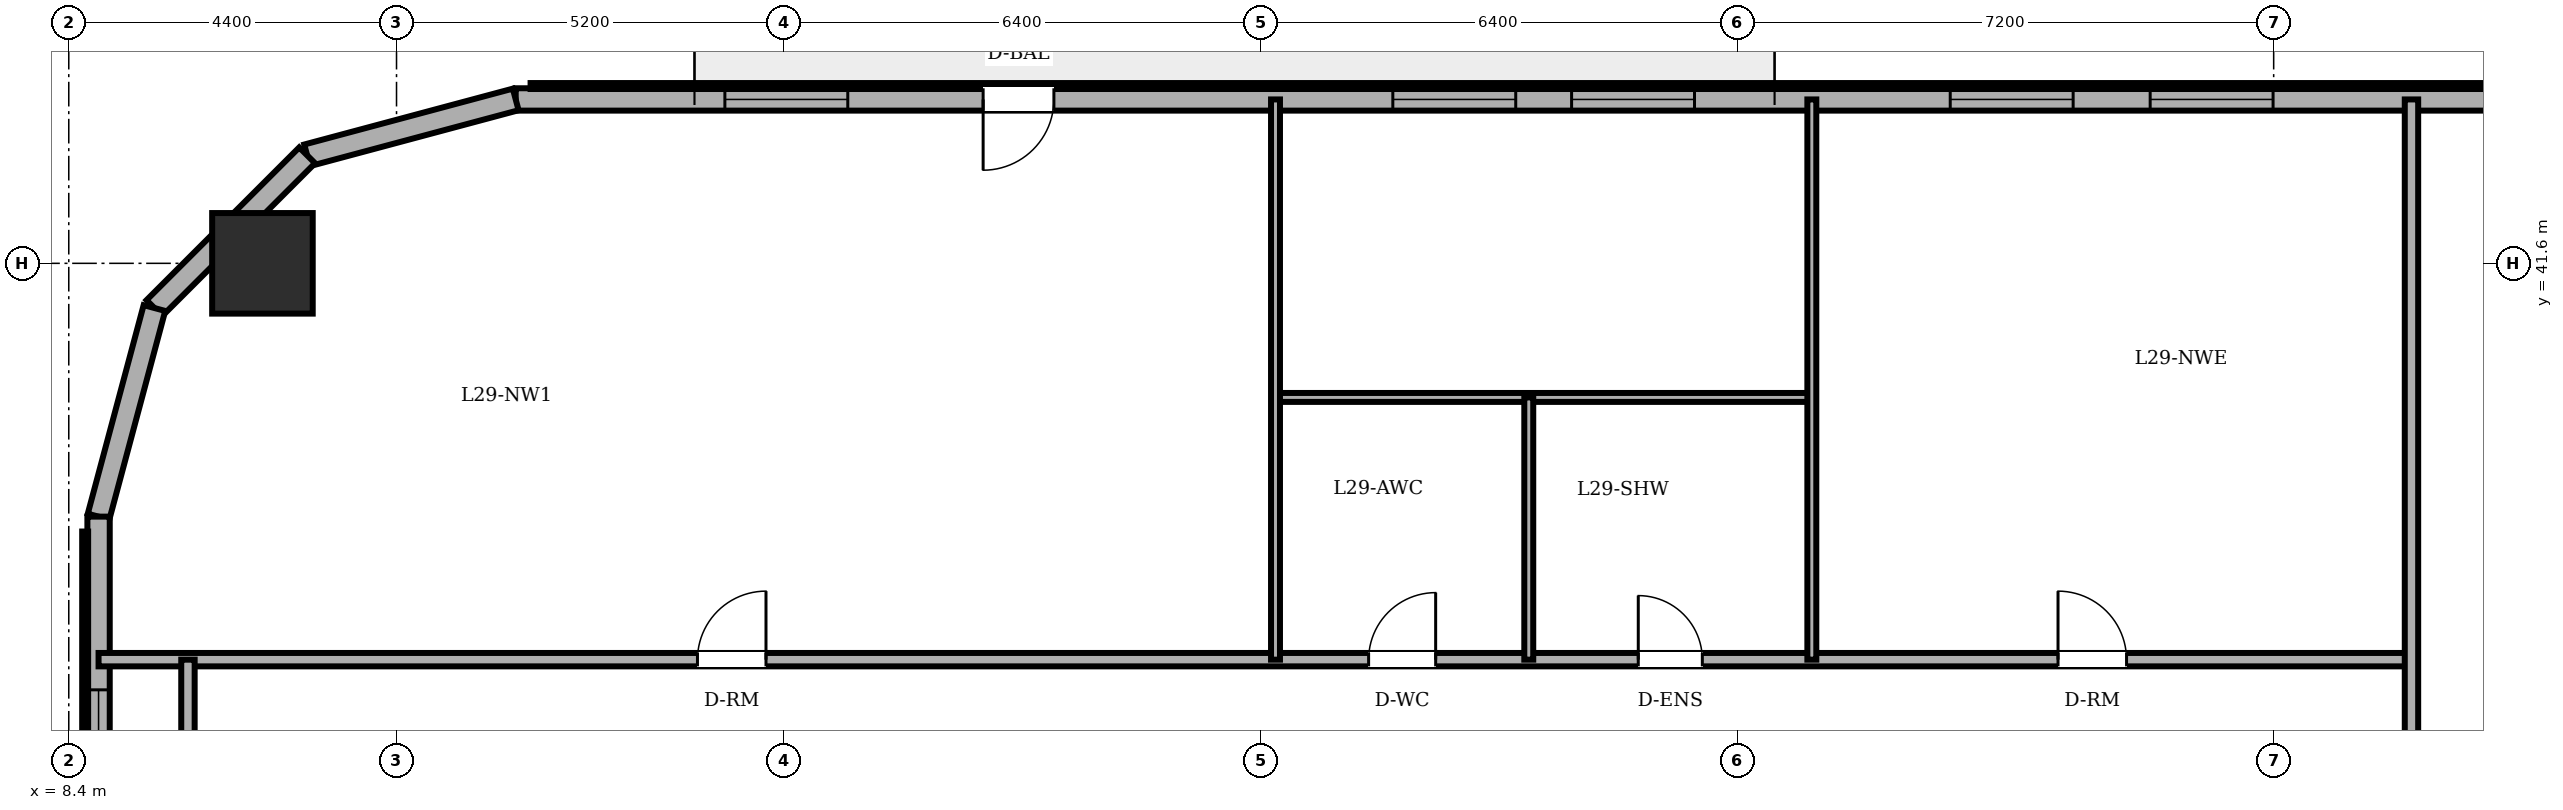
"""IFC4 building model, lengths in metres.
Left out: names, types, materials, properties, quantities, classifications, styles, units other than length and angle.
Written with IfcOpenShell. Run it as: python <this file> out.ifc"""

import sys

from ifc_helpers import new_model, si_unit, direction, frame, frame_2d, origin, origin_2d, place, context, subcontext, project, spatial, rectangle, circle, extrude, element, fill, save


model = new_model("IFC4")
c1 = context("Model", 3, precision=1e-05, world=origin(), true_north=direction((0.0, 1.0)))
c2 = subcontext(c1, "Body", "Model", "MODEL_VIEW")
j1 = project(units=[si_unit("LENGTHUNIT", "METRE"), si_unit("PLANEANGLEUNIT", "RADIAN")], contexts=[c1])
p1 = place(None, origin())
s1 = spatial("IfcSite", under=j1, at=p1, CompositionType="ELEMENT")
p2 = place(p1, origin())
s2 = spatial("IfcBuilding", under=s1, at=p2, CompositionType="ELEMENT")
p3 = place(p2, frame((0.0, 0.0, 111.5)))
s3 = spatial("IfcBuildingStorey", under=s2, at=p3, CompositionType="ELEMENT", Elevation=111.5)
p4 = place(p3, frame((11.0, 41.6, 0.0), z_axis=(0.0, 0.0, 1.0), x_axis=(1.0, 0.0, 0.0)))
e1 = element("IfcColumn", 1, at=p4, inside=s3, PredefinedType="COLUMN", context=c2, shape_type="SweptSolid", body=[
    extrude(circle(Radius=0.675, at=origin_2d()), origin(), (0.0, 0.0, 1.0), 3.6),
])
p5 = place(p3, frame((44.333, 43.8, 0.0), z_axis=(0.0, 0.0, 1.0), x_axis=(-1.0, 0.0, 0.0)))
e2 = element("IfcWall", 2, at=p5, inside=s3, PredefinedType="SOLIDWALL", context=c2, shape_type="SweptSolid", body=[
    extrude(rectangle(XDim=29.933, YDim=0.3, at=frame_2d((14.967, 0.0))), origin(), (0.0, 0.0, 1.0), 3.4),
])
p6 = place(p5, frame((22.708, 0.0, 0.0)))
e3 = element("IfcOpeningElement", 3, at=p6, cuts=e2, PredefinedType="OPENING", context=c2, shape_type="SweptSolid", body=[
    extrude(rectangle(XDim=0.95, YDim=2.2, at=frame_2d((0.475, 1.1))), frame((0.0, 0.16, 0.0), z_axis=(0.0, -1.0, 0.0), x_axis=(1.0, 0.0, 0.0)), (0.0, 0.0, 1.0), 0.32),
])
p7 = place(p5, frame((1.729, 0.0, 0.85)))
e4 = element("IfcOpeningElement", 4, at=p7, cuts=e2, PredefinedType="OPENING", context=c2, shape_type="SweptSolid", body=[
    extrude(rectangle(XDim=1.65, YDim=1.55, at=frame_2d((0.825, 0.775))), frame((0.0, 0.16, 0.0), z_axis=(0.0, -1.0, 0.0), x_axis=(1.0, 0.0, 0.0)), (0.0, 0.0, 1.0), 0.32),
])
p8 = place(p5, frame((6.341, 0.0, 0.85)))
e5 = element("IfcOpeningElement", 5, at=p8, cuts=e2, PredefinedType="OPENING", context=c2, shape_type="SweptSolid", body=[
    extrude(rectangle(XDim=1.65, YDim=1.55, at=frame_2d((0.825, 0.775))), frame((0.0, 0.16, 0.0), z_axis=(0.0, -1.0, 0.0), x_axis=(1.0, 0.0, 0.0)), (0.0, 0.0, 1.0), 0.32),
])
p9 = place(p5, frame((9.025, 0.0, 0.85)))
e6 = element("IfcOpeningElement", 6, at=p9, cuts=e2, PredefinedType="OPENING", context=c2, shape_type="SweptSolid", body=[
    extrude(rectangle(XDim=1.65, YDim=1.55, at=frame_2d((0.825, 0.775))), frame((0.0, 0.16, 0.0), z_axis=(0.0, -1.0, 0.0), x_axis=(1.0, 0.0, 0.0)), (0.0, 0.0, 1.0), 0.32),
])
p10 = place(p5, frame((14.108, 0.0, 0.85)))
e7 = element("IfcOpeningElement", 7, at=p10, cuts=e2, PredefinedType="OPENING", context=c2, shape_type="SweptSolid", body=[
    extrude(rectangle(XDim=1.65, YDim=1.55, at=frame_2d((0.825, 0.775))), frame((0.0, 0.16, 0.0), z_axis=(0.0, -1.0, 0.0), x_axis=(1.0, 0.0, 0.0)), (0.0, 0.0, 1.0), 0.32),
])
p11 = place(p5, frame((16.508, 0.0, 0.85)))
e8 = element("IfcOpeningElement", 8, at=p11, cuts=e2, PredefinedType="OPENING", context=c2, shape_type="SweptSolid", body=[
    extrude(rectangle(XDim=1.65, YDim=1.55, at=frame_2d((0.825, 0.775))), frame((0.0, 0.16, 0.0), z_axis=(0.0, -1.0, 0.0), x_axis=(1.0, 0.0, 0.0)), (0.0, 0.0, 1.0), 0.32),
])
p12 = place(p5, frame((25.475, 0.0, 0.85)))
e9 = element("IfcOpeningElement", 9, at=p12, cuts=e2, PredefinedType="OPENING", context=c2, shape_type="SweptSolid", body=[
    extrude(rectangle(XDim=1.65, YDim=1.55, at=frame_2d((0.825, 0.775))), frame((0.0, 0.16, 0.0), z_axis=(0.0, -1.0, 0.0), x_axis=(1.0, 0.0, 0.0)), (0.0, 0.0, 1.0), 0.32),
])
p13 = place(p3, frame((14.4, 43.8, 0.0), z_axis=(0.0, 0.0, 1.0), x_axis=(-0.965943540406, -0.258752926066, 0.0)))
e10 = element("IfcWall", 10, at=p13, inside=s3, PredefinedType="SOLIDWALL", context=c2, shape_type="SweptSolid", body=[
    extrude(rectangle(XDim=2.898, YDim=0.3, at=frame_2d((1.449, 0.0))), origin(), (0.0, 0.0, 1.0), 3.4),
])
p14 = place(p3, frame((11.6, 43.05, 0.0), z_axis=(0.0, 0.0, 1.0), x_axis=(-0.707106781187, -0.707106781187, 0.0)))
e11 = element("IfcWall", 11, at=p14, inside=s3, PredefinedType="SOLIDWALL", context=c2, shape_type="SweptSolid", body=[
    extrude(rectangle(XDim=2.899, YDim=0.3, at=frame_2d((1.45, 0.0))), origin(), (0.0, 0.0, 1.0), 3.4),
])
p15 = place(p3, frame((9.55, 41.0, 0.0), z_axis=(0.0, 0.0, 1.0), x_axis=(-0.258731875344, -0.96594917914, 0.0)))
e12 = element("IfcWall", 12, at=p15, inside=s3, PredefinedType="SOLIDWALL", context=c2, shape_type="SweptSolid", body=[
    extrude(rectangle(XDim=2.899, YDim=0.3, at=frame_2d((1.449, 0.0))), origin(), (0.0, 0.0, 1.0), 3.4),
])
p16 = place(p3, frame((8.8, 38.2, 0.0), z_axis=(0.0, 0.0, 1.0), x_axis=(0.0, -1.0, 0.0)))
e13 = element("IfcWall", 13, at=p16, inside=s3, PredefinedType="SOLIDWALL", context=c2, shape_type="SweptSolid", body=[
    extrude(rectangle(XDim=28.4, YDim=0.3, at=frame_2d((14.2, 0.0))), origin(), (0.0, 0.0, 1.0), 3.4),
])
p17 = place(p16, frame((2.325, 0.0, 0.85)))
e14 = element("IfcOpeningElement", 14, at=p17, cuts=e13, PredefinedType="OPENING", context=c2, shape_type="SweptSolid", body=[
    extrude(rectangle(XDim=1.65, YDim=1.55, at=frame_2d((0.825, 0.775))), frame((0.0, 0.16, 0.0), z_axis=(0.0, -1.0, 0.0), x_axis=(1.0, 0.0, 0.0)), (0.0, 0.0, 1.0), 0.32),
])
p18 = place(p16, frame((6.828, 0.0, 0.85)))
e15 = element("IfcOpeningElement", 15, at=p18, cuts=e13, PredefinedType="OPENING", context=c2, shape_type="SweptSolid", body=[
    extrude(rectangle(XDim=1.65, YDim=1.55, at=frame_2d((0.825, 0.775))), frame((0.0, 0.16, 0.0), z_axis=(0.0, -1.0, 0.0), x_axis=(1.0, 0.0, 0.0)), (0.0, 0.0, 1.0), 0.32),
])
p19 = place(p16, frame((10.102, 0.0, 0.85)))
e16 = element("IfcOpeningElement", 16, at=p19, cuts=e13, PredefinedType="OPENING", context=c2, shape_type="SweptSolid", body=[
    extrude(rectangle(XDim=1.65, YDim=1.55, at=frame_2d((0.825, 0.775))), frame((0.0, 0.16, 0.0), z_axis=(0.0, -1.0, 0.0), x_axis=(1.0, 0.0, 0.0)), (0.0, 0.0, 1.0), 0.32),
])
p20 = place(p16, frame((16.648, 0.0, 0.85)))
e17 = element("IfcOpeningElement", 17, at=p20, cuts=e13, PredefinedType="OPENING", context=c2, shape_type="SweptSolid", body=[
    extrude(rectangle(XDim=1.65, YDim=1.55, at=frame_2d((0.825, 0.775))), frame((0.0, 0.16, 0.0), z_axis=(0.0, -1.0, 0.0), x_axis=(1.0, 0.0, 0.0)), (0.0, 0.0, 1.0), 0.32),
])
p21 = place(p16, frame((19.922, 0.0, 0.85)))
e18 = element("IfcOpeningElement", 18, at=p21, cuts=e13, PredefinedType="OPENING", context=c2, shape_type="SweptSolid", body=[
    extrude(rectangle(XDim=1.65, YDim=1.55, at=frame_2d((0.825, 0.775))), frame((0.0, 0.16, 0.0), z_axis=(0.0, -1.0, 0.0), x_axis=(1.0, 0.0, 0.0)), (0.0, 0.0, 1.0), 0.32),
])
p22 = place(p16, frame((24.425, 0.0, 0.85)))
e19 = element("IfcOpeningElement", 19, at=p22, cuts=e13, PredefinedType="OPENING", context=c2, shape_type="SweptSolid", body=[
    extrude(rectangle(XDim=1.65, YDim=1.55, at=frame_2d((0.825, 0.775))), frame((0.0, 0.16, 0.0), z_axis=(0.0, -1.0, 0.0), x_axis=(1.0, 0.0, 0.0)), (0.0, 0.0, 1.0), 0.32),
])
p23 = place(p3, frame((8.8, 36.28, 0.0), z_axis=(0.0, 0.0, 1.0), x_axis=(1.0, 0.0, 0.0)))
e20 = element("IfcWall", 20, at=p23, inside=s3, PredefinedType="PARTITIONING", context=c2, shape_type="SweptSolid", body=[
    extrude(rectangle(XDim=31.05, YDim=0.18, at=frame_2d((15.525, 0.0))), origin(), (0.0, 0.0, 1.0), 3.4),
])
p24 = place(p23, frame((17.05, 0.0, 0.0)))
e21 = element("IfcOpeningElement", 21, at=p24, cuts=e20, PredefinedType="OPENING", context=c2, shape_type="SweptSolid", body=[
    extrude(rectangle(XDim=0.9, YDim=2.1, at=frame_2d((0.45, 1.05))), frame((0.0, 0.1, 0.0), z_axis=(0.0, -1.0, 0.0), x_axis=(1.0, 0.0, 0.0)), (0.0, 0.0, 1.0), 0.2),
])
p25 = place(p23, frame((20.67, 0.0, 0.0)))
e22 = element("IfcOpeningElement", 22, at=p25, cuts=e20, PredefinedType="OPENING", context=c2, shape_type="SweptSolid", body=[
    extrude(rectangle(XDim=0.86, YDim=2.1, at=frame_2d((0.43, 1.05))), frame((0.0, 0.1, 0.0), z_axis=(0.0, -1.0, 0.0), x_axis=(1.0, 0.0, 0.0)), (0.0, 0.0, 1.0), 0.2),
])
p26 = place(p23, frame((8.04, 0.0, 0.0)))
e23 = element("IfcOpeningElement", 23, at=p26, cuts=e20, PredefinedType="OPENING", context=c2, shape_type="SweptSolid", body=[
    extrude(rectangle(XDim=0.92, YDim=2.1, at=frame_2d((0.46, 1.05))), frame((0.0, 0.1, 0.0), z_axis=(0.0, -1.0, 0.0), x_axis=(1.0, 0.0, 0.0)), (0.0, 0.0, 1.0), 0.2),
])
p27 = place(p23, frame((26.305, 0.0, 0.0)))
e24 = element("IfcOpeningElement", 24, at=p27, cuts=e20, PredefinedType="OPENING", context=c2, shape_type="SweptSolid", body=[
    extrude(rectangle(XDim=0.92, YDim=2.1, at=frame_2d((0.46, 1.05))), frame((0.0, 0.1, 0.0), z_axis=(0.0, -1.0, 0.0), x_axis=(1.0, 0.0, 0.0)), (0.0, 0.0, 1.0), 0.2),
])
p28 = place(p3, frame((24.6, 39.8, 0.0), z_axis=(0.0, 0.0, 1.0), x_axis=(1.0, 0.0, 0.0)))
e25 = element("IfcWall", 25, at=p28, inside=s3, PredefinedType="PARTITIONING", context=c2, shape_type="SweptSolid", body=[
    extrude(rectangle(XDim=7.2, YDim=0.12, at=frame_2d((3.6, 0.0))), origin(), (0.0, 0.0, 1.0), 3.4),
])
p29 = place(p3, frame((10.0, 33.82, 0.0), z_axis=(0.0, 0.0, 1.0), x_axis=(0.0, 1.0, 0.0)))
e26 = element("IfcWall", 26, at=p29, inside=s3, PredefinedType="PARTITIONING", context=c2, shape_type="SweptSolid", body=[
    extrude(rectangle(XDim=2.46, YDim=0.18, at=frame_2d((1.23, 0.0))), origin(), (0.0, 0.0, 1.0), 3.4),
])
p30 = place(p3, frame((24.6, 36.28, 0.0), z_axis=(0.0, 0.0, 1.0), x_axis=(0.0, 1.0, 0.0)))
e27 = element("IfcWall", 27, at=p30, inside=s3, PredefinedType="PARTITIONING", context=c2, shape_type="SweptSolid", body=[
    extrude(rectangle(XDim=7.52, YDim=0.12, at=frame_2d((3.76, 0.0))), origin(), (0.0, 0.0, 1.0), 3.4),
])
p31 = place(p3, frame((28.0, 36.28, 0.0), z_axis=(0.0, 0.0, 1.0), x_axis=(0.0, 1.0, 0.0)))
e28 = element("IfcWall", 28, at=p31, inside=s3, PredefinedType="PARTITIONING", context=c2, shape_type="SweptSolid", body=[
    extrude(rectangle(XDim=3.52, YDim=0.12, at=frame_2d((1.76, 0.0))), origin(), (0.0, 0.0, 1.0), 3.4),
])
p32 = place(p3, frame((31.8, 36.28, 0.0), z_axis=(0.0, 0.0, 1.0), x_axis=(0.0, 1.0, 0.0)))
e29 = element("IfcWall", 29, at=p32, inside=s3, PredefinedType="PARTITIONING", context=c2, shape_type="SweptSolid", body=[
    extrude(rectangle(XDim=7.52, YDim=0.12, at=frame_2d((3.76, 0.0))), origin(), (0.0, 0.0, 1.0), 3.4),
])
p33 = place(p3, frame((39.85, 25.18, 0.0), z_axis=(0.0, 0.0, 1.0), x_axis=(0.0, 1.0, 0.0)))
e30 = element("IfcWall", 30, at=p33, inside=s3, PredefinedType="PARTITIONING", context=c2, shape_type="SweptSolid", body=[
    extrude(rectangle(XDim=18.62, YDim=0.18, at=frame_2d((9.31, 0.0))), origin(), (0.0, 0.0, 1.0), 3.4),
])
p34 = place(p33, frame((5.35, 0.0, 0.0)))
e31 = element("IfcOpeningElement", 31, at=p34, cuts=e30, PredefinedType="OPENING", context=c2, shape_type="SweptSolid", body=[
    extrude(rectangle(XDim=0.92, YDim=2.1, at=frame_2d((0.46, 1.05))), frame((0.0, 0.1, 0.0), z_axis=(0.0, -1.0, 0.0), x_axis=(1.0, 0.0, 0.0)), (0.0, 0.0, 1.0), 0.2),
])
p35 = place(p6, origin())
e32 = element("IfcDoor", 32, at=p35, inside=s3, OperationType="SINGLE_SWING_RIGHT", PredefinedType="DOOR", context=c2, shape_type="SweptSolid", body=[
    extrude(rectangle(XDim=0.95, YDim=2.2, at=frame_2d((0.475, 1.1))), frame((0.0, 0.025, 0.0), z_axis=(0.0, -1.0, 0.0), x_axis=(1.0, 0.0, 0.0)), (0.0, 0.0, 1.0), 0.05),
])
fill(e3, e32)
p36 = place(p8, origin())
e33 = element("IfcWindow", 33, at=p36, inside=s3, PartitioningType="DOUBLE_PANEL_VERTICAL", PredefinedType="WINDOW", context=c2, shape_type="SweptSolid", body=[
    extrude(rectangle(XDim=1.65, YDim=1.55, at=frame_2d((0.825, 0.775))), frame((0.0, 0.03, 0.0), z_axis=(0.0, -1.0, 0.0), x_axis=(1.0, 0.0, 0.0)), (0.0, 0.0, 1.0), 0.06),
])
fill(e5, e33)
p37 = place(p9, origin())
e34 = element("IfcWindow", 34, at=p37, inside=s3, PartitioningType="DOUBLE_PANEL_VERTICAL", PredefinedType="WINDOW", context=c2, shape_type="SweptSolid", body=[
    extrude(rectangle(XDim=1.65, YDim=1.55, at=frame_2d((0.825, 0.775))), frame((0.0, 0.03, 0.0), z_axis=(0.0, -1.0, 0.0), x_axis=(1.0, 0.0, 0.0)), (0.0, 0.0, 1.0), 0.06),
])
fill(e6, e34)
p38 = place(p10, origin())
e35 = element("IfcWindow", 35, at=p38, inside=s3, PartitioningType="DOUBLE_PANEL_VERTICAL", PredefinedType="WINDOW", context=c2, shape_type="SweptSolid", body=[
    extrude(rectangle(XDim=1.65, YDim=1.55, at=frame_2d((0.825, 0.775))), frame((0.0, 0.03, 0.0), z_axis=(0.0, -1.0, 0.0), x_axis=(1.0, 0.0, 0.0)), (0.0, 0.0, 1.0), 0.06),
])
fill(e7, e35)
p39 = place(p11, origin())
e36 = element("IfcWindow", 36, at=p39, inside=s3, PartitioningType="DOUBLE_PANEL_VERTICAL", PredefinedType="WINDOW", context=c2, shape_type="SweptSolid", body=[
    extrude(rectangle(XDim=1.65, YDim=1.55, at=frame_2d((0.825, 0.775))), frame((0.0, 0.03, 0.0), z_axis=(0.0, -1.0, 0.0), x_axis=(1.0, 0.0, 0.0)), (0.0, 0.0, 1.0), 0.06),
])
fill(e8, e36)
p40 = place(p12, origin())
e37 = element("IfcWindow", 37, at=p40, inside=s3, PartitioningType="DOUBLE_PANEL_VERTICAL", PredefinedType="WINDOW", context=c2, shape_type="SweptSolid", body=[
    extrude(rectangle(XDim=1.65, YDim=1.55, at=frame_2d((0.825, 0.775))), frame((0.0, 0.03, 0.0), z_axis=(0.0, -1.0, 0.0), x_axis=(1.0, 0.0, 0.0)), (0.0, 0.0, 1.0), 0.06),
])
fill(e9, e37)
p41 = place(p17, origin())
e38 = element("IfcWindow", 38, at=p41, inside=s3, PartitioningType="DOUBLE_PANEL_VERTICAL", PredefinedType="WINDOW", context=c2, shape_type="SweptSolid", body=[
    extrude(rectangle(XDim=1.65, YDim=1.55, at=frame_2d((0.825, 0.775))), frame((0.0, 0.03, 0.0), z_axis=(0.0, -1.0, 0.0), x_axis=(1.0, 0.0, 0.0)), (0.0, 0.0, 1.0), 0.06),
])
fill(e14, e38)
p42 = place(p24, origin())
e39 = element("IfcDoor", 39, at=p42, inside=s3, OperationType="SINGLE_SWING_RIGHT", PredefinedType="DOOR", context=c2, shape_type="SweptSolid", body=[
    extrude(rectangle(XDim=0.9, YDim=2.1, at=frame_2d((0.45, 1.05))), frame((0.0, 0.025, 0.0), z_axis=(0.0, -1.0, 0.0), x_axis=(1.0, 0.0, 0.0)), (0.0, 0.0, 1.0), 0.05),
])
fill(e21, e39)
p43 = place(p25, origin())
e40 = element("IfcDoor", 40, at=p43, inside=s3, OperationType="SINGLE_SWING_LEFT", PredefinedType="DOOR", context=c2, shape_type="SweptSolid", body=[
    extrude(rectangle(XDim=0.86, YDim=2.1, at=frame_2d((0.43, 1.05))), frame((0.0, 0.025, 0.0), z_axis=(0.0, -1.0, 0.0), x_axis=(1.0, 0.0, 0.0)), (0.0, 0.0, 1.0), 0.05),
])
fill(e22, e40)
p44 = place(p26, origin())
e41 = element("IfcDoor", 41, at=p44, inside=s3, OperationType="SINGLE_SWING_RIGHT", PredefinedType="DOOR", context=c2, shape_type="SweptSolid", body=[
    extrude(rectangle(XDim=0.92, YDim=2.1, at=frame_2d((0.46, 1.05))), frame((0.0, 0.025, 0.0), z_axis=(0.0, -1.0, 0.0), x_axis=(1.0, 0.0, 0.0)), (0.0, 0.0, 1.0), 0.05),
])
fill(e23, e41)
p45 = place(p27, origin())
e42 = element("IfcDoor", 42, at=p45, inside=s3, OperationType="SINGLE_SWING_LEFT", PredefinedType="DOOR", context=c2, shape_type="SweptSolid", body=[
    extrude(rectangle(XDim=0.92, YDim=2.1, at=frame_2d((0.46, 1.05))), frame((0.0, 0.025, 0.0), z_axis=(0.0, -1.0, 0.0), x_axis=(1.0, 0.0, 0.0)), (0.0, 0.0, 1.0), 0.05),
])
fill(e24, e42)
save(model, sys.argv[1])
